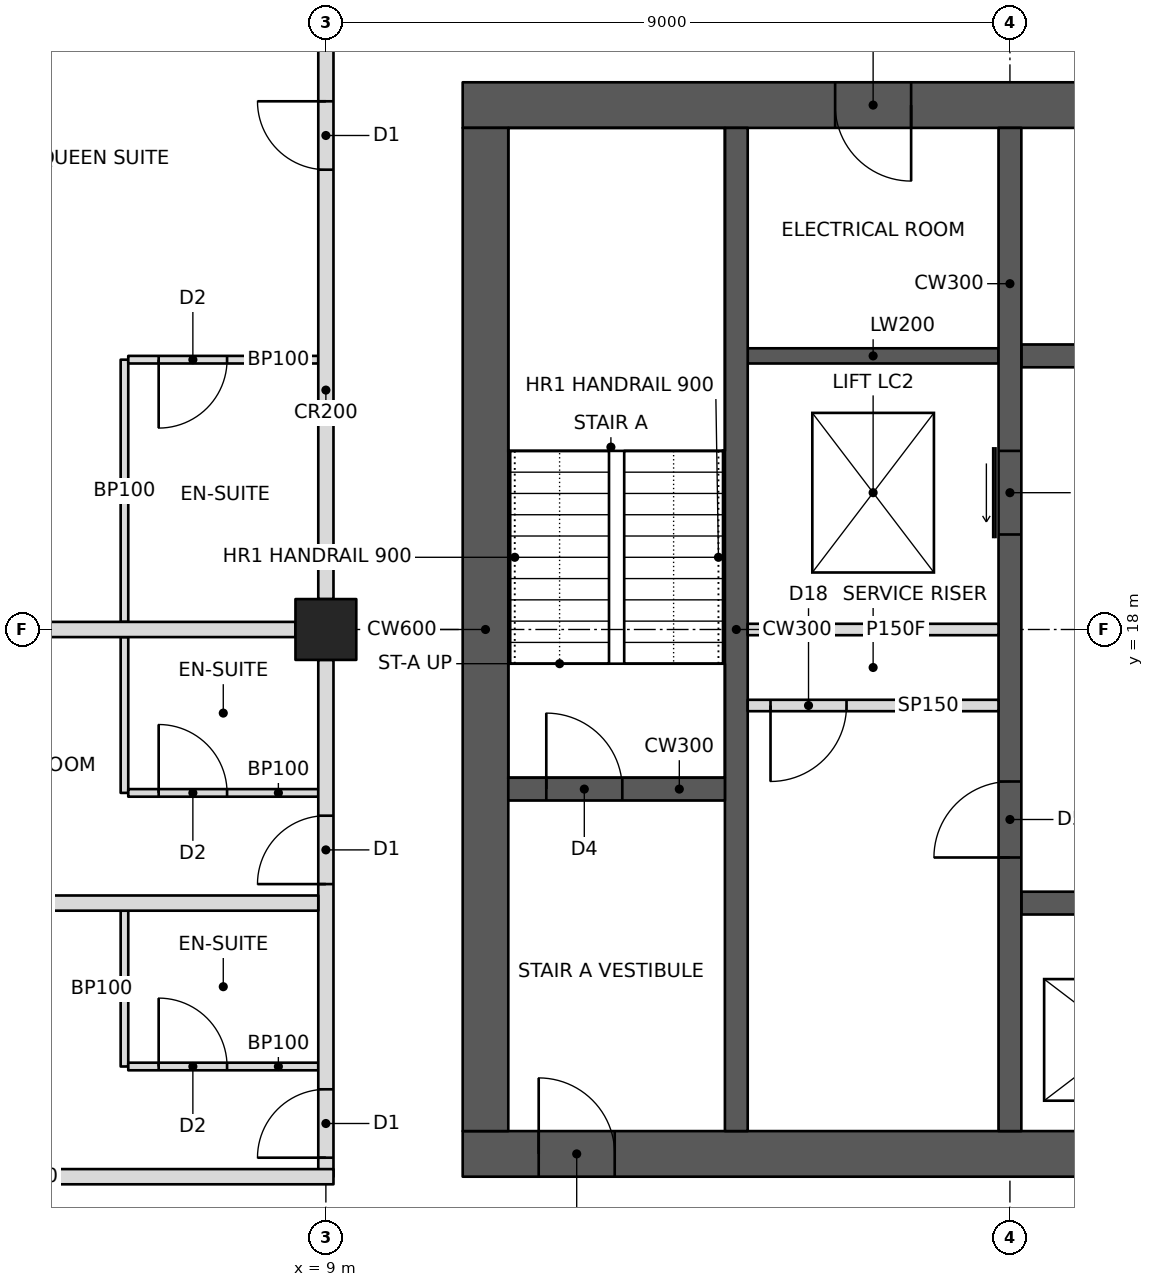
"""IFC4 building model, lengths in metres.
Left out: names, types, materials, properties, quantities, classifications, styles, units other than length and angle.
Written with IfcOpenShell. Run it as: python <this file> out.ifc"""

import sys

from ifc_helpers import new_model, si_unit, direction, frame, frame_2d, origin, origin_2d, place, context, subcontext, project, spatial, rectangle, hollow_rectangle, extrude, element, fill, save


model = new_model("IFC4")
c1 = context("Model", 3, precision=1e-05, world=origin(), true_north=direction((0.0, 1.0)))
c2 = subcontext(c1, "Body", "Model", "MODEL_VIEW")
j1 = project(units=[si_unit("LENGTHUNIT", "METRE"), si_unit("PLANEANGLEUNIT", "RADIAN")], contexts=[c1])
p1 = place(None, origin())
s1 = spatial("IfcSite", under=j1, at=p1, CompositionType="ELEMENT")
p2 = place(p1, origin())
s2 = spatial("IfcBuilding", under=s1, at=p2, CompositionType="ELEMENT")
p3 = place(p2, frame((0.0, 0.0, 251.8)))
s3 = spatial("IfcBuildingStorey", under=s2, at=p3, CompositionType="ELEMENT", Elevation=251.8)
p4 = place(p3, frame((9.0, 18.0, 0.0), z_axis=(0.0, 0.0, 1.0), x_axis=(1.0, 0.0, 0.0)))
e1 = element("IfcColumn", 1, at=p4, inside=s3, PredefinedType="COLUMN", context=c2, shape_type="SweptSolid", body=[
    extrude(hollow_rectangle(XDim=0.8, YDim=0.8, WallThickness=0.032, at=origin_2d()), origin(), (0.0, 0.0, 1.0), 3.6),
])
p5 = place(p3, frame((10.8, 11.1, 0.0), z_axis=(0.0, 0.0, 1.0), x_axis=(1.0, 0.0, 0.0)))
e2 = element("IfcWall", 2, at=p5, inside=s3, PredefinedType="SHEAR", context=c2, shape_type="SweptSolid", body=[
    extrude(rectangle(XDim=23.4, YDim=0.6, at=frame_2d((11.7, 0.0))), origin(), (0.0, 0.0, 1.0), 3.6),
])
p6 = place(p5, frame((1.0, 0.0, 0.0)))
e3 = element("IfcOpeningElement", 3, at=p6, cuts=e2, PredefinedType="OPENING", context=c2, shape_type="SweptSolid", body=[
    extrude(rectangle(XDim=1.0, YDim=2.1, at=frame_2d((0.5, 1.05))), frame((0.0, 0.31, 0.0), z_axis=(0.0, -1.0, 0.0), x_axis=(1.0, 0.0, 0.0)), (0.0, 0.0, 1.0), 0.62),
])
p7 = place(p5, frame((17.2, 0.0, 0.0)))
e4 = element("IfcOpeningElement", 4, at=p7, cuts=e2, PredefinedType="OPENING", context=c2, shape_type="SweptSolid", body=[
    extrude(rectangle(XDim=1.8, YDim=2.1, at=frame_2d((0.9, 1.05))), frame((0.0, 0.31, 0.0), z_axis=(0.0, -1.0, 0.0), x_axis=(1.0, 0.0, 0.0)), (0.0, 0.0, 1.0), 0.62),
])
p8 = place(p3, frame((10.8, 24.9, 0.0), z_axis=(0.0, 0.0, 1.0), x_axis=(1.0, 0.0, 0.0)))
e5 = element("IfcWall", 5, at=p8, inside=s3, PredefinedType="SHEAR", context=c2, shape_type="SweptSolid", body=[
    extrude(rectangle(XDim=23.4, YDim=0.6, at=frame_2d((11.7, 0.0))), origin(), (0.0, 0.0, 1.0), 3.6),
])
p9 = place(p8, frame((17.2, 0.0, 0.0)))
e6 = element("IfcOpeningElement", 6, at=p9, cuts=e5, PredefinedType="OPENING", context=c2, shape_type="SweptSolid", body=[
    extrude(rectangle(XDim=1.8, YDim=2.1, at=frame_2d((0.9, 1.05))), frame((0.0, 0.31, 0.0), z_axis=(0.0, -1.0, 0.0), x_axis=(1.0, 0.0, 0.0)), (0.0, 0.0, 1.0), 0.62),
])
p10 = place(p8, frame((21.1, 0.0, 0.0)))
e7 = element("IfcOpeningElement", 7, at=p10, cuts=e5, PredefinedType="OPENING", context=c2, shape_type="SweptSolid", body=[
    extrude(rectangle(XDim=1.0, YDim=2.1, at=frame_2d((0.5, 1.05))), frame((0.0, 0.31, 0.0), z_axis=(0.0, -1.0, 0.0), x_axis=(1.0, 0.0, 0.0)), (0.0, 0.0, 1.0), 0.62),
])
p11 = place(p8, frame((4.9, 0.0, 0.0)))
e8 = element("IfcOpeningElement", 8, at=p11, cuts=e5, PredefinedType="OPENING", context=c2, shape_type="SweptSolid", body=[
    extrude(rectangle(XDim=1.0, YDim=2.1, at=frame_2d((0.5, 1.05))), frame((0.0, 0.31, 0.0), z_axis=(0.0, -1.0, 0.0), x_axis=(1.0, 0.0, 0.0)), (0.0, 0.0, 1.0), 0.62),
])
p12 = place(p3, frame((11.1, 11.4, 0.0), z_axis=(0.0, 0.0, 1.0), x_axis=(0.0, 1.0, 0.0)))
e9 = element("IfcWall", 9, at=p12, inside=s3, PredefinedType="SHEAR", context=c2, shape_type="SweptSolid", body=[
    extrude(rectangle(XDim=13.2, YDim=0.6, at=frame_2d((6.6, 0.0))), origin(), (0.0, 0.0, 1.0), 3.6),
])
p13 = place(p3, frame((14.4, 11.4, 0.0), z_axis=(0.0, 0.0, 1.0), x_axis=(0.0, 1.0, 0.0)))
e10 = element("IfcWall", 10, at=p13, inside=s3, PredefinedType="SHEAR", context=c2, shape_type="SweptSolid", body=[
    extrude(rectangle(XDim=13.2, YDim=0.3, at=frame_2d((6.6, 0.0))), origin(), (0.0, 0.0, 1.0), 3.6),
])
p14 = place(p3, frame((11.4, 15.9, 0.0), z_axis=(0.0, 0.0, 1.0), x_axis=(1.0, 0.0, 0.0)))
e11 = element("IfcWall", 11, at=p14, inside=s3, PredefinedType="SHEAR", context=c2, shape_type="SweptSolid", body=[
    extrude(rectangle(XDim=2.85, YDim=0.3, at=frame_2d((1.425, 0.0))), origin(), (0.0, 0.0, 1.0), 3.6),
])
p15 = place(p14, frame((0.5, 0.0, 0.0)))
e12 = element("IfcOpeningElement", 12, at=p15, cuts=e11, PredefinedType="OPENING", context=c2, shape_type="SweptSolid", body=[
    extrude(rectangle(XDim=1.0, YDim=2.1, at=frame_2d((0.5, 1.05))), frame((0.0, 0.16, 0.0), z_axis=(0.0, -1.0, 0.0), x_axis=(1.0, 0.0, 0.0)), (0.0, 0.0, 1.0), 0.32),
])
p16 = place(p3, frame((18.0, 11.4, 0.0), z_axis=(0.0, 0.0, 1.0), x_axis=(0.0, 1.0, 0.0)))
e13 = element("IfcWall", 13, at=p16, inside=s3, PredefinedType="SHEAR", context=c2, shape_type="SweptSolid", body=[
    extrude(rectangle(XDim=13.2, YDim=0.3, at=frame_2d((6.6, 0.0))), origin(), (0.0, 0.0, 1.0), 3.6),
])
p17 = place(p16, frame((3.6, 0.0, 0.0)))
e14 = element("IfcOpeningElement", 14, at=p17, cuts=e13, PredefinedType="OPENING", context=c2, shape_type="SweptSolid", body=[
    extrude(rectangle(XDim=1.0, YDim=2.1, at=frame_2d((0.5, 1.05))), frame((0.0, 0.16, 0.0), z_axis=(0.0, -1.0, 0.0), x_axis=(1.0, 0.0, 0.0)), (0.0, 0.0, 1.0), 0.32),
])
p18 = place(p16, frame((7.85, 0.0, 0.0)))
e15 = element("IfcOpeningElement", 15, at=p18, cuts=e13, PredefinedType="OPENING", context=c2, shape_type="SweptSolid", body=[
    extrude(rectangle(XDim=1.1, YDim=2.1, at=frame_2d((0.55, 1.05))), frame((0.0, 0.16, 0.0), z_axis=(0.0, -1.0, 0.0), x_axis=(1.0, 0.0, 0.0)), (0.0, 0.0, 1.0), 0.32),
])
p19 = place(p3, frame((14.55, 18.0, 0.0), z_axis=(0.0, 0.0, 1.0), x_axis=(1.0, 0.0, 0.0)))
e16 = element("IfcWall", 16, at=p19, inside=s3, PredefinedType="PARTITIONING", context=c2, shape_type="SweptSolid", body=[
    extrude(rectangle(XDim=3.3, YDim=0.15, at=frame_2d((1.65, 0.0))), origin(), (0.0, 0.0, 1.0), 3.4),
])
p20 = place(p3, frame((18.15, 14.4, 0.0), z_axis=(0.0, 0.0, 1.0), x_axis=(1.0, 0.0, 0.0)))
e17 = element("IfcWall", 17, at=p20, inside=s3, PredefinedType="SHEAR", context=c2, shape_type="SweptSolid", body=[
    extrude(rectangle(XDim=9.0, YDim=0.3, at=frame_2d((4.5, 0.0))), origin(), (0.0, 0.0, 1.0), 3.6),
])
p21 = place(p20, frame((0.8, 0.0, 0.0)))
e18 = element("IfcOpeningElement", 18, at=p21, cuts=e17, PredefinedType="OPENING", context=c2, shape_type="SweptSolid", body=[
    extrude(rectangle(XDim=1.1, YDim=2.1, at=frame_2d((0.55, 1.05))), frame((0.0, 0.16, 0.0), z_axis=(0.0, -1.0, 0.0), x_axis=(1.0, 0.0, 0.0)), (0.0, 0.0, 1.0), 0.32),
])
p22 = place(p20, frame((6.75, 0.0, 0.0)))
e19 = element("IfcOpeningElement", 19, at=p22, cuts=e17, PredefinedType="OPENING", context=c2, shape_type="SweptSolid", body=[
    extrude(rectangle(XDim=1.2, YDim=2.1, at=frame_2d((0.6, 1.05))), frame((0.0, 0.16, 0.0), z_axis=(0.0, -1.0, 0.0), x_axis=(1.0, 0.0, 0.0)), (0.0, 0.0, 1.0), 0.32),
])
p23 = place(p20, frame((3.8, 0.0, 0.0)))
e20 = element("IfcOpeningElement", 20, at=p23, cuts=e17, PredefinedType="OPENING", context=c2, shape_type="SweptSolid", body=[
    extrude(rectangle(XDim=1.1, YDim=2.1, at=frame_2d((0.55, 1.05))), frame((0.0, 0.16, 0.0), z_axis=(0.0, -1.0, 0.0), x_axis=(1.0, 0.0, 0.0)), (0.0, 0.0, 1.0), 0.32),
])
p24 = place(p3, frame((18.15, 21.6, 0.0), z_axis=(0.0, 0.0, 1.0), x_axis=(1.0, 0.0, 0.0)))
e21 = element("IfcWall", 21, at=p24, inside=s3, PredefinedType="SHEAR", context=c2, shape_type="SweptSolid", body=[
    extrude(rectangle(XDim=9.0, YDim=0.3, at=frame_2d((4.5, 0.0))), origin(), (0.0, 0.0, 1.0), 3.6),
])
p25 = place(p24, frame((6.75, 0.0, 0.0)))
e22 = element("IfcOpeningElement", 22, at=p25, cuts=e21, PredefinedType="OPENING", context=c2, shape_type="SweptSolid", body=[
    extrude(rectangle(XDim=1.2, YDim=2.1, at=frame_2d((0.6, 1.05))), frame((0.0, 0.16, 0.0), z_axis=(0.0, -1.0, 0.0), x_axis=(1.0, 0.0, 0.0)), (0.0, 0.0, 1.0), 0.32),
])
p26 = place(p24, frame((0.8, 0.0, 0.0)))
e23 = element("IfcOpeningElement", 23, at=p26, cuts=e21, PredefinedType="OPENING", context=c2, shape_type="SweptSolid", body=[
    extrude(rectangle(XDim=1.1, YDim=2.1, at=frame_2d((0.55, 1.05))), frame((0.0, 0.16, 0.0), z_axis=(0.0, -1.0, 0.0), x_axis=(1.0, 0.0, 0.0)), (0.0, 0.0, 1.0), 0.32),
])
p27 = place(p24, frame((3.8, 0.0, 0.0)))
e24 = element("IfcOpeningElement", 24, at=p27, cuts=e21, PredefinedType="OPENING", context=c2, shape_type="SweptSolid", body=[
    extrude(rectangle(XDim=1.1, YDim=2.1, at=frame_2d((0.55, 1.05))), frame((0.0, 0.16, 0.0), z_axis=(0.0, -1.0, 0.0), x_axis=(1.0, 0.0, 0.0)), (0.0, 0.0, 1.0), 0.32),
])
p28 = place(p3, frame((14.55, 21.6, 0.0), z_axis=(0.0, 0.0, 1.0), x_axis=(1.0, 0.0, 0.0)))
e25 = element("IfcWall", 25, at=p28, inside=s3, PredefinedType="SHEAR", context=c2, shape_type="SweptSolid", body=[
    extrude(rectangle(XDim=3.3, YDim=0.2, at=frame_2d((1.65, 0.0))), origin(), (0.0, 0.0, 1.0), 3.6),
])
p29 = place(p3, frame((9.0, 10.8, 0.0), z_axis=(0.0, 0.0, 1.0), x_axis=(0.0, 1.0, 0.0)))
e26 = element("IfcWall", 26, at=p29, inside=s3, PredefinedType="PARTITIONING", context=c2, shape_type="SweptSolid", body=[
    extrude(rectangle(XDim=6.8, YDim=0.2, at=frame_2d((3.4, 0.0))), origin(), (0.0, 0.0, 1.0), 2.605),
])
p30 = place(p29, frame((0.25, 0.0, 0.0)))
e27 = element("IfcOpeningElement", 27, at=p30, cuts=e26, PredefinedType="OPENING", context=c2, shape_type="SweptSolid", body=[
    extrude(rectangle(XDim=0.9, YDim=2.1, at=frame_2d((0.45, 1.05))), frame((0.0, 0.11, 0.0), z_axis=(0.0, -1.0, 0.0), x_axis=(1.0, 0.0, 0.0)), (0.0, 0.0, 1.0), 0.22),
])
p31 = place(p29, frame((3.85, 0.0, 0.0)))
e28 = element("IfcOpeningElement", 28, at=p31, cuts=e26, PredefinedType="OPENING", context=c2, shape_type="SweptSolid", body=[
    extrude(rectangle(XDim=0.9, YDim=2.1, at=frame_2d((0.45, 1.05))), frame((0.0, 0.11, 0.0), z_axis=(0.0, -1.0, 0.0), x_axis=(1.0, 0.0, 0.0)), (0.0, 0.0, 1.0), 0.22),
])
p32 = place(p3, frame((9.0, 18.4, 0.0), z_axis=(0.0, 0.0, 1.0), x_axis=(0.0, 1.0, 0.0)))
e29 = element("IfcWall", 29, at=p32, inside=s3, PredefinedType="PARTITIONING", context=c2, shape_type="SweptSolid", body=[
    extrude(rectangle(XDim=8.2, YDim=0.2, at=frame_2d((4.1, 0.0))), origin(), (0.0, 0.0, 1.0), 2.605),
])
p33 = place(p32, frame((5.65, 0.0, 0.0)))
e30 = element("IfcOpeningElement", 30, at=p33, cuts=e29, PredefinedType="OPENING", context=c2, shape_type="SweptSolid", body=[
    extrude(rectangle(XDim=0.9, YDim=2.1, at=frame_2d((0.45, 1.05))), frame((0.0, 0.11, 0.0), z_axis=(0.0, -1.0, 0.0), x_axis=(1.0, 0.0, 0.0)), (0.0, 0.0, 1.0), 0.22),
])
p34 = place(p3, frame((1.0, 10.8, 0.0), z_axis=(0.0, 0.0, 1.0), x_axis=(1.0, 0.0, 0.0)))
e31 = element("IfcWall", 31, at=p34, inside=s3, PredefinedType="PARTITIONING", context=c2, shape_type="SweptSolid", body=[
    extrude(rectangle(XDim=8.1, YDim=0.2, at=frame_2d((4.05, 0.0))), origin(), (0.0, 0.0, 1.0), 2.604),
])
p35 = place(p3, frame((8.9, 14.4, 0.0), z_axis=(0.0, 0.0, 1.0), x_axis=(-1.0, 0.0, 0.0)))
e32 = element("IfcWall", 32, at=p35, inside=s3, PredefinedType="PARTITIONING", context=c2, shape_type="SweptSolid", body=[
    extrude(rectangle(XDim=7.9, YDim=0.2, at=frame_2d((3.95, 0.0))), origin(), (0.0, 0.0, 1.0), 2.604),
])
p36 = place(p3, frame((8.6, 18.0, 0.0), z_axis=(0.0, 0.0, 1.0), x_axis=(-1.0, 0.0, 0.0)))
e33 = element("IfcWall", 33, at=p36, inside=s3, PredefinedType="PARTITIONING", context=c2, shape_type="SweptSolid", body=[
    extrude(rectangle(XDim=7.6, YDim=0.2, at=frame_2d((3.8, 0.0))), origin(), (0.0, 0.0, 1.0), 2.605),
])
p37 = place(p3, frame((6.35, 12.25, 0.0), z_axis=(0.0, 0.0, 1.0), x_axis=(0.0, 1.0, 0.0)))
e34 = element("IfcWall", 34, at=p37, inside=s3, PredefinedType="PARTITIONING", context=c2, shape_type="SweptSolid", body=[
    extrude(rectangle(XDim=2.05, YDim=0.1, at=frame_2d((1.025, 0.0))), origin(), (0.0, 0.0, 1.0), 3.4),
])
p38 = place(p3, frame((8.9, 12.25, 0.0), z_axis=(0.0, 0.0, 1.0), x_axis=(-1.0, 0.0, 0.0)))
e35 = element("IfcWall", 35, at=p38, inside=s3, PredefinedType="PARTITIONING", context=c2, shape_type="SweptSolid", body=[
    extrude(rectangle(XDim=2.5, YDim=0.1, at=frame_2d((1.25, 0.0))), origin(), (0.0, 0.0, 1.0), 2.604),
])
p39 = place(p38, frame((1.2, 0.0, 0.0)))
e36 = element("IfcOpeningElement", 36, at=p39, cuts=e35, PredefinedType="OPENING", context=c2, shape_type="SweptSolid", body=[
    extrude(rectangle(XDim=0.9, YDim=2.1, at=frame_2d((0.45, 1.05))), frame((0.0, 0.06, 0.0), z_axis=(0.0, -1.0, 0.0), x_axis=(1.0, 0.0, 0.0)), (0.0, 0.0, 1.0), 0.12),
])
p40 = place(p3, frame((6.35, 15.85, 0.0), z_axis=(0.0, 0.0, 1.0), x_axis=(0.0, 1.0, 0.0)))
e37 = element("IfcWall", 37, at=p40, inside=s3, PredefinedType="PARTITIONING", context=c2, shape_type="SweptSolid", body=[
    extrude(rectangle(XDim=2.05, YDim=0.1, at=frame_2d((1.025, 0.0))), origin(), (0.0, 0.0, 1.0), 2.604),
])
p41 = place(p3, frame((8.9, 15.85, 0.0), z_axis=(0.0, 0.0, 1.0), x_axis=(-1.0, 0.0, 0.0)))
e38 = element("IfcWall", 38, at=p41, inside=s3, PredefinedType="PARTITIONING", context=c2, shape_type="SweptSolid", body=[
    extrude(rectangle(XDim=2.5, YDim=0.1, at=frame_2d((1.25, 0.0))), origin(), (0.0, 0.0, 1.0), 2.604),
])
p42 = place(p41, frame((1.2, 0.0, 0.0)))
e39 = element("IfcOpeningElement", 39, at=p42, cuts=e38, PredefinedType="OPENING", context=c2, shape_type="SweptSolid", body=[
    extrude(rectangle(XDim=0.9, YDim=2.1, at=frame_2d((0.45, 1.05))), frame((0.0, 0.06, 0.0), z_axis=(0.0, -1.0, 0.0), x_axis=(1.0, 0.0, 0.0)), (0.0, 0.0, 1.0), 0.12),
])
p43 = place(p3, frame((6.35, 18.1, 0.0), z_axis=(0.0, 0.0, 1.0), x_axis=(0.0, 1.0, 0.0)))
e40 = element("IfcWall", 40, at=p43, inside=s3, PredefinedType="PARTITIONING", context=c2, shape_type="SweptSolid", body=[
    extrude(rectangle(XDim=3.45, YDim=0.1, at=frame_2d((1.725, 0.0))), origin(), (0.0, 0.0, 1.0), 2.604),
])
p44 = place(p3, frame((8.9, 21.55, 0.0), z_axis=(0.0, 0.0, 1.0), x_axis=(-1.0, 0.0, 0.0)))
e41 = element("IfcWall", 41, at=p44, inside=s3, PredefinedType="PARTITIONING", context=c2, shape_type="SweptSolid", body=[
    extrude(rectangle(XDim=2.5, YDim=0.1, at=frame_2d((1.25, 0.0))), origin(), (0.0, 0.0, 1.0), 2.604),
])
p45 = place(p44, frame((1.2, 0.0, 0.0)))
e42 = element("IfcOpeningElement", 42, at=p45, cuts=e41, PredefinedType="OPENING", context=c2, shape_type="SweptSolid", body=[
    extrude(rectangle(XDim=0.9, YDim=2.1, at=frame_2d((0.45, 1.05))), frame((0.0, 0.06, 0.0), z_axis=(0.0, -1.0, 0.0), x_axis=(1.0, 0.0, 0.0)), (0.0, 0.0, 1.0), 0.12),
])
p46 = place(p3, frame((14.55, 17.0, 0.0), z_axis=(0.0, 0.0, 1.0), x_axis=(1.0, 0.0, 0.0)))
e43 = element("IfcWall", 43, at=p46, inside=s3, PredefinedType="PARTITIONING", context=c2, shape_type="SweptSolid", body=[
    extrude(rectangle(XDim=3.3, YDim=0.15, at=frame_2d((1.65, 0.0))), origin(), (0.0, 0.0, 1.0), 3.4),
])
p47 = place(p46, frame((0.3, 0.0, 0.0)))
e44 = element("IfcOpeningElement", 44, at=p47, cuts=e43, PredefinedType="OPENING", context=c2, shape_type="SweptSolid", body=[
    extrude(rectangle(XDim=1.0, YDim=2.1, at=frame_2d((0.5, 1.05))), frame((0.0, 0.085, 0.0), z_axis=(0.0, -1.0, 0.0), x_axis=(1.0, 0.0, 0.0)), (0.0, 0.0, 1.0), 0.17),
])
p48 = place(p39, frame((0.9, 0.0, 0.0), z_axis=(0.0, 0.0, 1.0), x_axis=(-1.0, 0.0, 0.0)))
e45 = element("IfcDoor", 45, at=p48, inside=s3, OperationType="SINGLE_SWING_LEFT", PredefinedType="DOOR", context=c2, shape_type="SweptSolid", body=[
    extrude(rectangle(XDim=0.9, YDim=2.1, at=frame_2d((0.45, 1.05))), frame((0.0, 0.025, 0.0), z_axis=(0.0, -1.0, 0.0), x_axis=(1.0, 0.0, 0.0)), (0.0, 0.0, 1.0), 0.05),
])
fill(e36, e45)
p49 = place(p30, origin())
e46 = element("IfcDoor", 46, at=p49, inside=s3, OperationType="SINGLE_SWING_LEFT", PredefinedType="DOOR", context=c2, shape_type="SweptSolid", body=[
    extrude(rectangle(XDim=0.9, YDim=2.1, at=frame_2d((0.45, 1.05))), frame((0.0, 0.025, 0.0), z_axis=(0.0, -1.0, 0.0), x_axis=(1.0, 0.0, 0.0)), (0.0, 0.0, 1.0), 0.05),
])
fill(e27, e46)
p50 = place(p42, frame((0.9, 0.0, 0.0), z_axis=(0.0, 0.0, 1.0), x_axis=(-1.0, 0.0, 0.0)))
e47 = element("IfcDoor", 47, at=p50, inside=s3, OperationType="SINGLE_SWING_LEFT", PredefinedType="DOOR", context=c2, shape_type="SweptSolid", body=[
    extrude(rectangle(XDim=0.9, YDim=2.1, at=frame_2d((0.45, 1.05))), frame((0.0, 0.025, 0.0), z_axis=(0.0, -1.0, 0.0), x_axis=(1.0, 0.0, 0.0)), (0.0, 0.0, 1.0), 0.05),
])
fill(e39, e47)
p51 = place(p31, origin())
e48 = element("IfcDoor", 48, at=p51, inside=s3, OperationType="SINGLE_SWING_LEFT", PredefinedType="DOOR", context=c2, shape_type="SweptSolid", body=[
    extrude(rectangle(XDim=0.9, YDim=2.1, at=frame_2d((0.45, 1.05))), frame((0.0, 0.025, 0.0), z_axis=(0.0, -1.0, 0.0), x_axis=(1.0, 0.0, 0.0)), (0.0, 0.0, 1.0), 0.05),
])
fill(e28, e48)
p52 = place(p45, origin())
e49 = element("IfcDoor", 49, at=p52, inside=s3, OperationType="SINGLE_SWING_RIGHT", PredefinedType="DOOR", context=c2, shape_type="SweptSolid", body=[
    extrude(rectangle(XDim=0.9, YDim=2.1, at=frame_2d((0.45, 1.05))), frame((0.0, 0.025, 0.0), z_axis=(0.0, -1.0, 0.0), x_axis=(1.0, 0.0, 0.0)), (0.0, 0.0, 1.0), 0.05),
])
fill(e42, e49)
p53 = place(p33, origin())
e50 = element("IfcDoor", 50, at=p53, inside=s3, OperationType="SINGLE_SWING_RIGHT", PredefinedType="DOOR", context=c2, shape_type="SweptSolid", body=[
    extrude(rectangle(XDim=0.9, YDim=2.1, at=frame_2d((0.45, 1.05))), frame((0.0, 0.025, 0.0), z_axis=(0.0, -1.0, 0.0), x_axis=(1.0, 0.0, 0.0)), (0.0, 0.0, 1.0), 0.05),
])
fill(e30, e50)
p54 = place(p47, frame((1.0, 0.0, 0.0), z_axis=(0.0, 0.0, 1.0), x_axis=(-1.0, 0.0, 0.0)))
e51 = element("IfcDoor", 51, at=p54, inside=s3, OperationType="SINGLE_SWING_RIGHT", PredefinedType="DOOR", context=c2, shape_type="SweptSolid", body=[
    extrude(rectangle(XDim=1.0, YDim=2.1, at=frame_2d((0.5, 1.05))), frame((0.0, 0.025, 0.0), z_axis=(0.0, -1.0, 0.0), x_axis=(1.0, 0.0, 0.0)), (0.0, 0.0, 1.0), 0.05),
])
fill(e44, e51)
p55 = place(p6, origin())
e52 = element("IfcDoor", 52, at=p55, inside=s3, OperationType="SINGLE_SWING_LEFT", PredefinedType="DOOR", context=c2, shape_type="SweptSolid", body=[
    extrude(rectangle(XDim=1.0, YDim=2.1, at=frame_2d((0.5, 1.05))), frame((0.0, 0.025, 0.0), z_axis=(0.0, -1.0, 0.0), x_axis=(1.0, 0.0, 0.0)), (0.0, 0.0, 1.0), 0.05),
])
fill(e3, e52)
p56 = place(p15, origin())
e53 = element("IfcDoor", 53, at=p56, inside=s3, OperationType="SINGLE_SWING_LEFT", PredefinedType="DOOR", context=c2, shape_type="SweptSolid", body=[
    extrude(rectangle(XDim=1.0, YDim=2.1, at=frame_2d((0.5, 1.05))), frame((0.0, 0.025, 0.0), z_axis=(0.0, -1.0, 0.0), x_axis=(1.0, 0.0, 0.0)), (0.0, 0.0, 1.0), 0.05),
])
fill(e12, e53)
p57 = place(p17, origin())
e54 = element("IfcDoor", 54, at=p57, inside=s3, OperationType="SINGLE_SWING_LEFT", PredefinedType="DOOR", context=c2, shape_type="SweptSolid", body=[
    extrude(rectangle(XDim=1.0, YDim=2.1, at=frame_2d((0.5, 1.05))), frame((0.0, 0.025, 0.0), z_axis=(0.0, -1.0, 0.0), x_axis=(1.0, 0.0, 0.0)), (0.0, 0.0, 1.0), 0.05),
])
fill(e14, e54)
p58 = place(p11, frame((1.0, 0.0, 0.0), z_axis=(0.0, 0.0, 1.0), x_axis=(-1.0, 0.0, 0.0)))
e55 = element("IfcDoor", 55, at=p58, inside=s3, OperationType="SINGLE_SWING_LEFT", PredefinedType="DOOR", context=c2, shape_type="SweptSolid", body=[
    extrude(rectangle(XDim=1.0, YDim=2.1, at=frame_2d((0.5, 1.05))), frame((0.0, 0.025, 0.0), z_axis=(0.0, -1.0, 0.0), x_axis=(1.0, 0.0, 0.0)), (0.0, 0.0, 1.0), 0.05),
])
fill(e8, e55)
p59 = place(p18, origin())
e56 = element("IfcDoor", 56, at=p59, inside=s3, OperationType="SLIDING_TO_LEFT", PredefinedType="DOOR", context=c2, shape_type="SweptSolid", body=[
    extrude(rectangle(XDim=1.1, YDim=2.1, at=frame_2d((0.55, 1.05))), frame((0.0, 0.025, 0.0), z_axis=(0.0, -1.0, 0.0), x_axis=(1.0, 0.0, 0.0)), (0.0, 0.0, 1.0), 0.05),
])
fill(e15, e56)
save(model, sys.argv[1])
